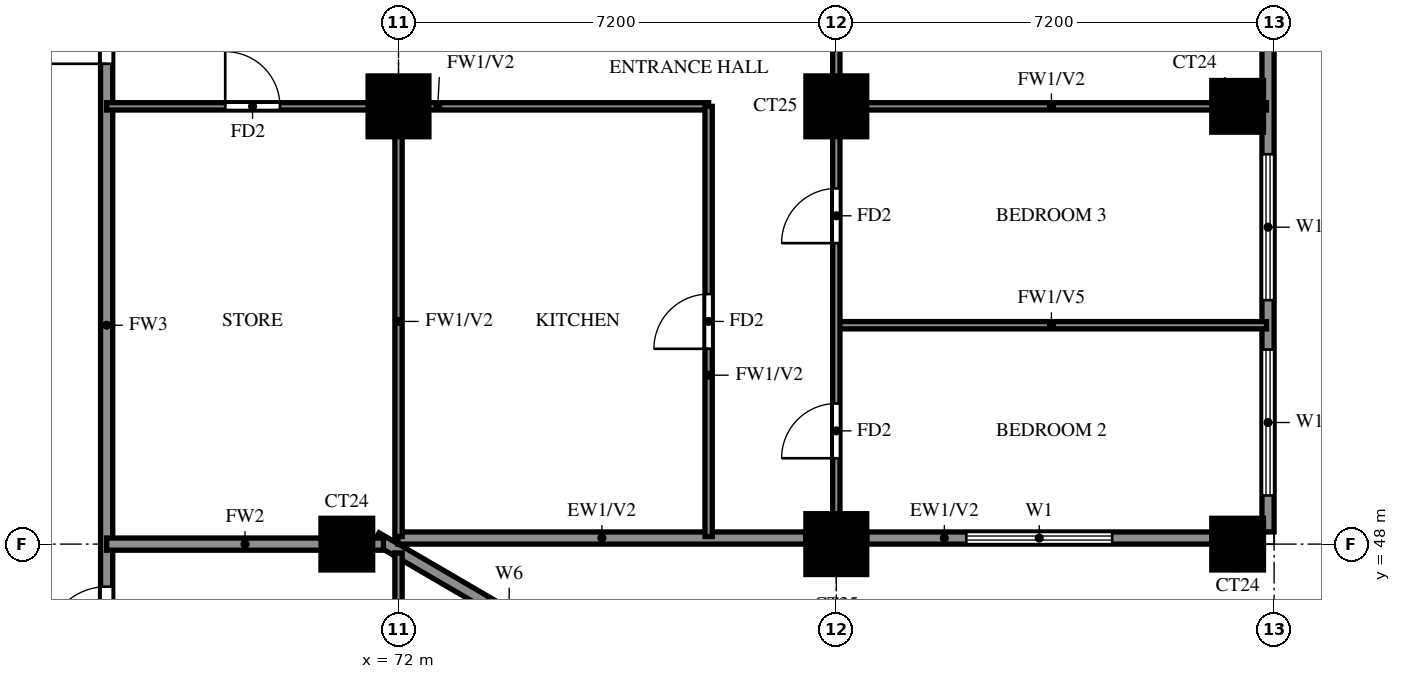
"""IFC4 building model, lengths in metres.
Left out: names, types, materials, properties, quantities, classifications, styles, units other than length and angle.
Written with IfcOpenShell. Run it as: python <this file> out.ifc"""

import sys

from ifc_helpers import new_model, si_unit, direction, frame, frame_2d, origin, origin_2d, place, context, subcontext, project, spatial, rectangle, extrude, source, transform, mapped, element, fill, save


model = new_model("IFC4")
c1 = context("Model", 3, precision=1e-05, world=origin(), true_north=direction((0.0, 1.0)))
c2 = subcontext(c1, "Body", "Model", "MODEL_VIEW")
j1 = project(units=[si_unit("LENGTHUNIT", "METRE"), si_unit("PLANEANGLEUNIT", "RADIAN")], contexts=[c1])
p1 = place(None, origin())
s1 = spatial("IfcSite", under=j1, at=p1, CompositionType="ELEMENT")
p2 = place(p1, origin())
s2 = spatial("IfcBuilding", under=s1, at=p2, CompositionType="ELEMENT")
p3 = place(p2, frame((0.0, 0.0, 153.5)))
s3 = spatial("IfcBuildingStorey", under=s2, at=p3, CompositionType="ELEMENT", Elevation=153.5)
m1 = source(origin(), c2, "Body", "SweptSolid", [
    extrude(rectangle(XDim=0.85, YDim=0.85, at=origin_2d()), origin(), (0.0, 0.0, 1.0), 3.2),
])
p4 = place(p3, frame((71.15, 48.0, 0.0), z_axis=(0.0, 0.0, 1.0), x_axis=(1.0, 0.0, 0.0)))
e1 = element("IfcColumn", 1, at=p4, inside=s3, PredefinedType="COLUMN", context=c2, shape_type="MappedRepresentation", body=[
    mapped(m1, transform((0.0, 0.0, 0.0))),
])
m2 = source(origin(), c2, "Body", "SweptSolid", [
    extrude(rectangle(XDim=1.0, YDim=1.0, at=origin_2d()), origin(), (0.0, 0.0, 1.0), 3.2),
])
p5 = place(p3, frame((79.2, 48.0, 0.0), z_axis=(0.0, 0.0, 1.0), x_axis=(1.0, 0.0, 0.0)))
e2 = element("IfcColumn", 2, at=p5, inside=s3, PredefinedType="COLUMN", context=c2, shape_type="MappedRepresentation", body=[
    mapped(m2, transform((0.0, 0.0, 0.0))),
])
p6 = place(p3, frame((85.8, 48.0, 0.0), z_axis=(0.0, 0.0, 1.0), x_axis=(1.0, 0.0, 0.0)))
e3 = element("IfcColumn", 3, at=p6, inside=s3, PredefinedType="COLUMN", context=c2, shape_type="MappedRepresentation", body=[
    mapped(m1, transform((0.0, 0.0, 0.0))),
])
for number, where, z_axis, x_axis in (
    (4, (72.0, 55.2, 0.0), (0.0, 0.0, 1.0), (1.0, 0.0, 0.0)),
    (5, (79.2, 55.2, 0.0), (0.0, 0.0, 1.0), (1.0, 0.0, 0.0)),
):
    element("IfcColumn", number, at=place(p3, frame(where, z_axis=z_axis, x_axis=x_axis)), inside=s3, PredefinedType="COLUMN", context=c2, shape_type="MappedRepresentation", body=[
        mapped(m2, transform((0.0, 0.0, 0.0))),
    ])
p7 = place(p3, frame((85.8, 55.2, 0.0), z_axis=(0.0, 0.0, 1.0), x_axis=(1.0, 0.0, 0.0)))
e6 = element("IfcColumn", 6, at=p7, inside=s3, PredefinedType="COLUMN", context=c2, shape_type="MappedRepresentation", body=[
    mapped(m1, transform((0.0, 0.0, 0.0))),
])
p8 = place(p3, frame((85.719, 39.881, 0.0), z_axis=(0.0, 0.0, 1.0), x_axis=(-0.86377618652, 0.503875678716, 0.0)))
e7 = element("IfcWall", 7, at=p8, inside=s3, PredefinedType="SOLIDWALL", context=c2, shape_type="SweptSolid", body=[
    extrude(rectangle(XDim=16.311, YDim=0.2, at=frame_2d((8.156, 0.0))), origin(), (0.0, 0.0, 1.0), 3.2),
])
p9 = place(p8, frame((13.326, 0.0, 1.5)))
e8 = element("IfcOpeningElement", 8, at=p9, cuts=e7, PredefinedType="OPENING", context=c2, shape_type="SweptSolid", body=[
    extrude(rectangle(XDim=0.9, YDim=0.9, at=frame_2d((0.45, 0.45))), frame((0.0, 0.11, 0.0), z_axis=(0.0, -1.0, 0.0), x_axis=(1.0, 0.0, 0.0)), (0.0, 0.0, 1.0), 0.22),
])
p10 = place(p3, frame((71.99, 48.1, 0.0), z_axis=(0.0, 0.0, 1.0), x_axis=(1.0, 0.0, 0.0)))
e9 = element("IfcWall", 9, at=p10, inside=s3, PredefinedType="SOLIDWALL", context=c2, shape_type="SweptSolid", body=[
    extrude(rectangle(XDim=6.71, YDim=0.2, at=frame_2d((3.355, 0.0))), origin(), (0.0, 0.0, 1.0), 3.2),
])
p11 = place(p3, frame((79.7, 48.1, 0.0), z_axis=(0.0, 0.0, 1.0), x_axis=(1.0, 0.0, 0.0)))
e10 = element("IfcWall", 10, at=p11, inside=s3, PredefinedType="SOLIDWALL", context=c2, shape_type="SweptSolid", body=[
    extrude(rectangle(XDim=5.675, YDim=0.2, at=frame_2d((2.837, 0.0))), origin(), (0.0, 0.0, 1.0), 3.2),
])
p12 = place(p11, frame((1.637, 0.0, 0.6)))
e11 = element("IfcOpeningElement", 11, at=p12, cuts=e10, PredefinedType="OPENING", context=c2, shape_type="SweptSolid", body=[
    extrude(rectangle(XDim=2.4, YDim=2.4, at=frame_2d((1.2, 1.2))), frame((0.0, 0.11, 0.0), z_axis=(0.0, -1.0, 0.0), x_axis=(1.0, 0.0, 0.0)), (0.0, 0.0, 1.0), 0.22),
])
p13 = place(p3, frame((86.3, 48.2, 0.0), z_axis=(0.0, 0.0, 1.0), x_axis=(0.0, 1.0, 0.0)))
e12 = element("IfcWall", 12, at=p13, inside=s3, PredefinedType="SOLIDWALL", context=c2, shape_type="SweptSolid", body=[
    extrude(rectangle(XDim=28.6, YDim=0.2, at=frame_2d((14.3, 0.0))), origin(), (0.0, 0.0, 1.0), 3.2),
])
p14 = place(p13, frame((15.1, 0.0, 0.0)))
e13 = element("IfcOpeningElement", 13, at=p14, cuts=e12, PredefinedType="OPENING", context=c2, shape_type="SweptSolid", body=[
    extrude(rectangle(XDim=1.8, YDim=2.4, at=frame_2d((0.9, 1.2))), frame((0.0, 0.11, 0.0), z_axis=(0.0, -1.0, 0.0), x_axis=(1.0, 0.0, 0.0)), (0.0, 0.0, 1.0), 0.22),
])
p15 = place(p13, frame((0.6, 0.0, 0.6)))
e14 = element("IfcOpeningElement", 14, at=p15, cuts=e12, PredefinedType="OPENING", context=c2, shape_type="SweptSolid", body=[
    extrude(rectangle(XDim=2.4, YDim=2.4, at=frame_2d((1.2, 1.2))), frame((0.0, 0.11, 0.0), z_axis=(0.0, -1.0, 0.0), x_axis=(1.0, 0.0, 0.0)), (0.0, 0.0, 1.0), 0.22),
])
p16 = place(p13, frame((3.812, 0.0, 0.6)))
e15 = element("IfcOpeningElement", 15, at=p16, cuts=e12, PredefinedType="OPENING", context=c2, shape_type="SweptSolid", body=[
    extrude(rectangle(XDim=2.4, YDim=2.4, at=frame_2d((1.2, 1.2))), frame((0.0, 0.11, 0.0), z_axis=(0.0, -1.0, 0.0), x_axis=(1.0, 0.0, 0.0)), (0.0, 0.0, 1.0), 0.22),
])
p17 = place(p13, frame((8.387, 0.0, 0.6)))
e16 = element("IfcOpeningElement", 16, at=p17, cuts=e12, PredefinedType="OPENING", context=c2, shape_type="SweptSolid", body=[
    extrude(rectangle(XDim=2.4, YDim=2.4, at=frame_2d((1.2, 1.2))), frame((0.0, 0.11, 0.0), z_axis=(0.0, -1.0, 0.0), x_axis=(1.0, 0.0, 0.0)), (0.0, 0.0, 1.0), 0.22),
])
p18 = place(p13, frame((12.512, 0.0, 0.6)))
e17 = element("IfcOpeningElement", 17, at=p18, cuts=e12, PredefinedType="OPENING", context=c2, shape_type="SweptSolid", body=[
    extrude(rectangle(XDim=1.2, YDim=2.4, at=frame_2d((0.6, 1.2))), frame((0.0, 0.11, 0.0), z_axis=(0.0, -1.0, 0.0), x_axis=(1.0, 0.0, 0.0)), (0.0, 0.0, 1.0), 0.22),
])
p19 = place(p13, frame((19.113, 0.0, 0.6)))
e18 = element("IfcOpeningElement", 18, at=p19, cuts=e12, PredefinedType="OPENING", context=c2, shape_type="SweptSolid", body=[
    extrude(rectangle(XDim=1.8, YDim=2.4, at=frame_2d((0.9, 1.2))), frame((0.0, 0.11, 0.0), z_axis=(0.0, -1.0, 0.0), x_axis=(1.0, 0.0, 0.0)), (0.0, 0.0, 1.0), 0.22),
])
p20 = place(p13, frame((22.188, 0.0, 0.6)))
e19 = element("IfcOpeningElement", 19, at=p20, cuts=e12, PredefinedType="OPENING", context=c2, shape_type="SweptSolid", body=[
    extrude(rectangle(XDim=2.4, YDim=2.4, at=frame_2d((1.2, 1.2))), frame((0.0, 0.11, 0.0), z_axis=(0.0, -1.0, 0.0), x_axis=(1.0, 0.0, 0.0)), (0.0, 0.0, 1.0), 0.22),
])
p21 = place(p13, frame((25.413, 0.0, 0.6)))
e20 = element("IfcOpeningElement", 20, at=p21, cuts=e12, PredefinedType="OPENING", context=c2, shape_type="SweptSolid", body=[
    extrude(rectangle(XDim=2.4, YDim=2.4, at=frame_2d((1.2, 1.2))), frame((0.0, 0.11, 0.0), z_axis=(0.0, -1.0, 0.0), x_axis=(1.0, 0.0, 0.0)), (0.0, 0.0, 1.0), 0.22),
])
p22 = place(p3, frame((67.2, 45.6, 0.0), z_axis=(0.0, 0.0, 1.0), x_axis=(0.0, 1.0, 0.0)))
e21 = element("IfcWall", 21, at=p22, inside=s3, PredefinedType="SOLIDWALL", context=c2, shape_type="SweptSolid", body=[
    extrude(rectangle(XDim=12.0, YDim=0.2, at=frame_2d((6.0, 0.0))), origin(), (0.0, 0.0, 1.0), 3.2),
])
p23 = place(p22, frame((10.3, 0.0, 0.0)))
e22 = element("IfcOpeningElement", 22, at=p23, cuts=e21, PredefinedType="OPENING", context=c2, shape_type="SweptSolid", body=[
    extrude(rectangle(XDim=1.0, YDim=2.1, at=frame_2d((0.5, 1.05))), frame((0.0, 0.11, 0.0), z_axis=(0.0, -1.0, 0.0), x_axis=(1.0, 0.0, 0.0)), (0.0, 0.0, 1.0), 0.22),
])
p24 = place(p22, frame((0.7, 0.0, 0.0)))
e23 = element("IfcOpeningElement", 23, at=p24, cuts=e21, PredefinedType="OPENING", context=c2, shape_type="SweptSolid", body=[
    extrude(rectangle(XDim=1.0, YDim=2.1, at=frame_2d((0.5, 1.05))), frame((0.0, 0.11, 0.0), z_axis=(0.0, -1.0, 0.0), x_axis=(1.0, 0.0, 0.0)), (0.0, 0.0, 1.0), 0.22),
])
p25 = place(p3, frame((67.2, 48.0, 0.0), z_axis=(0.0, 0.0, 1.0), x_axis=(1.0, 0.0, 0.0)))
e24 = element("IfcWall", 24, at=p25, inside=s3, PredefinedType="SOLIDWALL", context=c2, shape_type="SweptSolid", body=[
    extrude(rectangle(XDim=4.552, YDim=0.2, at=frame_2d((2.276, 0.0))), origin(), (0.0, 0.0, 1.0), 3.2),
])
p26 = place(p3, frame((79.2, 51.6, 0.0), z_axis=(0.0, 0.0, 1.0), x_axis=(1.0, 0.0, 0.0)))
e25 = element("IfcWall", 25, at=p26, inside=s3, PredefinedType="PARTITIONING", context=c2, shape_type="SweptSolid", body=[
    extrude(rectangle(XDim=7.075, YDim=0.12, at=frame_2d((3.538, 0.0))), origin(), (0.0, 0.0, 1.0), 2.3),
])
p27 = place(p3, frame((67.2, 55.2, 0.0), z_axis=(0.0, 0.0, 1.0), x_axis=(1.0, 0.0, 0.0)))
e26 = element("IfcWall", 26, at=p27, inside=s3, PredefinedType="PARTITIONING", context=c2, shape_type="SweptSolid", body=[
    extrude(rectangle(XDim=9.9, YDim=0.12, at=frame_2d((4.95, 0.0))), origin(), (0.0, 0.0, 1.0), 3.2),
])
p28 = place(p27, frame((1.95, 0.0, 0.0)))
e27 = element("IfcOpeningElement", 27, at=p28, cuts=e26, PredefinedType="OPENING", context=c2, shape_type="SweptSolid", body=[
    extrude(rectangle(XDim=0.9, YDim=2.1, at=frame_2d((0.45, 1.05))), frame((0.0, 0.07, 0.0), z_axis=(0.0, -1.0, 0.0), x_axis=(1.0, 0.0, 0.0)), (0.0, 0.0, 1.0), 0.14),
])
p29 = place(p3, frame((79.2, 55.2, 0.0), z_axis=(0.0, 0.0, 1.0), x_axis=(1.0, 0.0, 0.0)))
e28 = element("IfcWall", 28, at=p29, inside=s3, PredefinedType="PARTITIONING", context=c2, shape_type="SweptSolid", body=[
    extrude(rectangle(XDim=7.075, YDim=0.12, at=frame_2d((3.538, 0.0))), origin(), (0.0, 0.0, 1.0), 3.2),
])
p30 = place(p3, frame((72.0, 39.725, 0.0), z_axis=(0.0, 0.0, 1.0), x_axis=(0.0, 1.0, 0.0)))
e29 = element("IfcWall", 29, at=p30, inside=s3, PredefinedType="PARTITIONING", context=c2, shape_type="SweptSolid", body=[
    extrude(rectangle(XDim=8.13, YDim=0.12, at=frame_2d((4.065, 0.0))), origin(), (0.0, 0.0, 1.0), 2.3),
])
p31 = place(p30, frame((1.788, 0.0, 0.0)))
e30 = element("IfcOpeningElement", 30, at=p31, cuts=e29, PredefinedType="OPENING", context=c2, shape_type="SweptSolid", body=[
    extrude(rectangle(XDim=0.9, YDim=2.1, at=frame_2d((0.45, 1.05))), frame((0.0, 0.07, 0.0), z_axis=(0.0, -1.0, 0.0), x_axis=(1.0, 0.0, 0.0)), (0.0, 0.0, 1.0), 0.14),
])
p32 = place(p30, frame((4.575, 0.0, 0.0)))
e31 = element("IfcOpeningElement", 31, at=p32, cuts=e29, PredefinedType="OPENING", context=c2, shape_type="SweptSolid", body=[
    extrude(rectangle(XDim=0.8, YDim=2.1, at=frame_2d((0.4, 1.05))), frame((0.0, 0.07, 0.0), z_axis=(0.0, -1.0, 0.0), x_axis=(1.0, 0.0, 0.0)), (0.0, 0.0, 1.0), 0.14),
])
p33 = place(p3, frame((72.0, 48.125, 0.0), z_axis=(0.0, 0.0, 1.0), x_axis=(0.0, 1.0, 0.0)))
e32 = element("IfcWall", 32, at=p33, inside=s3, PredefinedType="PARTITIONING", context=c2, shape_type="SweptSolid", body=[
    extrude(rectangle(XDim=7.075, YDim=0.12, at=frame_2d((3.538, 0.0))), origin(), (0.0, 0.0, 1.0), 3.2),
])
p34 = place(p3, frame((77.1, 48.125, 0.0), z_axis=(0.0, 0.0, 1.0), x_axis=(0.0, 1.0, 0.0)))
e33 = element("IfcWall", 33, at=p34, inside=s3, PredefinedType="PARTITIONING", context=c2, shape_type="SweptSolid", body=[
    extrude(rectangle(XDim=7.075, YDim=0.12, at=frame_2d((3.538, 0.0))), origin(), (0.0, 0.0, 1.0), 3.2),
])
p35 = place(p34, frame((3.087, 0.0, 0.0)))
e34 = element("IfcOpeningElement", 34, at=p35, cuts=e33, PredefinedType="OPENING", context=c2, shape_type="SweptSolid", body=[
    extrude(rectangle(XDim=0.9, YDim=2.1, at=frame_2d((0.45, 1.05))), frame((0.0, 0.07, 0.0), z_axis=(0.0, -1.0, 0.0), x_axis=(1.0, 0.0, 0.0)), (0.0, 0.0, 1.0), 0.14),
])
p36 = place(p3, frame((79.2, 48.125, 0.0), z_axis=(0.0, 0.0, 1.0), x_axis=(0.0, 1.0, 0.0)))
e35 = element("IfcWall", 35, at=p36, inside=s3, PredefinedType="PARTITIONING", context=c2, shape_type="SweptSolid", body=[
    extrude(rectangle(XDim=25.075, YDim=0.12, at=frame_2d((12.538, 0.0))), origin(), (0.0, 0.0, 1.0), 3.2),
])
p37 = place(p36, frame((1.288, 0.0, 0.0)))
e36 = element("IfcOpeningElement", 36, at=p37, cuts=e35, PredefinedType="OPENING", context=c2, shape_type="SweptSolid", body=[
    extrude(rectangle(XDim=0.9, YDim=2.1, at=frame_2d((0.45, 1.05))), frame((0.0, 0.07, 0.0), z_axis=(0.0, -1.0, 0.0), x_axis=(1.0, 0.0, 0.0)), (0.0, 0.0, 1.0), 0.14),
])
p38 = place(p36, frame((4.825, 0.0, 0.0)))
e37 = element("IfcOpeningElement", 37, at=p38, cuts=e35, PredefinedType="OPENING", context=c2, shape_type="SweptSolid", body=[
    extrude(rectangle(XDim=0.9, YDim=2.1, at=frame_2d((0.45, 1.05))), frame((0.0, 0.07, 0.0), z_axis=(0.0, -1.0, 0.0), x_axis=(1.0, 0.0, 0.0)), (0.0, 0.0, 1.0), 0.14),
])
p39 = place(p36, frame((9.925, 0.0, 0.0)))
e38 = element("IfcOpeningElement", 38, at=p39, cuts=e35, PredefinedType="OPENING", context=c2, shape_type="SweptSolid", body=[
    extrude(rectangle(XDim=1.5, YDim=2.1, at=frame_2d((0.75, 1.05))), frame((0.0, 0.07, 0.0), z_axis=(0.0, -1.0, 0.0), x_axis=(1.0, 0.0, 0.0)), (0.0, 0.0, 1.0), 0.14),
])
p40 = place(p36, frame((15.625, 0.0, 0.0)))
e39 = element("IfcOpeningElement", 39, at=p40, cuts=e35, PredefinedType="OPENING", context=c2, shape_type="SweptSolid", body=[
    extrude(rectangle(XDim=0.9, YDim=2.1, at=frame_2d((0.45, 1.05))), frame((0.0, 0.07, 0.0), z_axis=(0.0, -1.0, 0.0), x_axis=(1.0, 0.0, 0.0)), (0.0, 0.0, 1.0), 0.14),
])
p41 = place(p36, frame((19.225, 0.0, 0.0)))
e40 = element("IfcOpeningElement", 40, at=p41, cuts=e35, PredefinedType="OPENING", context=c2, shape_type="SweptSolid", body=[
    extrude(rectangle(XDim=0.9, YDim=2.1, at=frame_2d((0.45, 1.05))), frame((0.0, 0.07, 0.0), z_axis=(0.0, -1.0, 0.0), x_axis=(1.0, 0.0, 0.0)), (0.0, 0.0, 1.0), 0.14),
])
p42 = place(p36, frame((22.825, 0.0, 0.0)))
e41 = element("IfcOpeningElement", 41, at=p42, cuts=e35, PredefinedType="OPENING", context=c2, shape_type="SweptSolid", body=[
    extrude(rectangle(XDim=0.9, YDim=2.1, at=frame_2d((0.45, 1.05))), frame((0.0, 0.07, 0.0), z_axis=(0.0, -1.0, 0.0), x_axis=(1.0, 0.0, 0.0)), (0.0, 0.0, 1.0), 0.14),
])
p43 = place(p12, origin())
e42 = element("IfcWindow", 42, at=p43, inside=s3, PartitioningType="DOUBLE_PANEL_VERTICAL", PredefinedType="WINDOW", context=c2, shape_type="SweptSolid", body=[
    extrude(rectangle(XDim=2.4, YDim=2.4, at=frame_2d((1.2, 1.2))), frame((0.0, 0.03, 0.0), z_axis=(0.0, -1.0, 0.0), x_axis=(1.0, 0.0, 0.0)), (0.0, 0.0, 1.0), 0.06),
])
fill(e11, e42)
p44 = place(p15, origin())
e43 = element("IfcWindow", 43, at=p44, inside=s3, PartitioningType="DOUBLE_PANEL_VERTICAL", PredefinedType="WINDOW", context=c2, shape_type="SweptSolid", body=[
    extrude(rectangle(XDim=2.4, YDim=2.4, at=frame_2d((1.2, 1.2))), frame((0.0, 0.03, 0.0), z_axis=(0.0, -1.0, 0.0), x_axis=(1.0, 0.0, 0.0)), (0.0, 0.0, 1.0), 0.06),
])
fill(e14, e43)
p45 = place(p16, origin())
e44 = element("IfcWindow", 44, at=p45, inside=s3, PartitioningType="DOUBLE_PANEL_VERTICAL", PredefinedType="WINDOW", context=c2, shape_type="SweptSolid", body=[
    extrude(rectangle(XDim=2.4, YDim=2.4, at=frame_2d((1.2, 1.2))), frame((0.0, 0.03, 0.0), z_axis=(0.0, -1.0, 0.0), x_axis=(1.0, 0.0, 0.0)), (0.0, 0.0, 1.0), 0.06),
])
fill(e15, e44)
p46 = place(p23, origin())
e45 = element("IfcDoor", 45, at=p46, inside=s3, OperationType="SINGLE_SWING_LEFT", PredefinedType="DOOR", context=c2, shape_type="SweptSolid", body=[
    extrude(rectangle(XDim=1.0, YDim=2.1, at=frame_2d((0.5, 1.05))), frame((0.0, 0.025, 0.0), z_axis=(0.0, -1.0, 0.0), x_axis=(1.0, 0.0, 0.0)), (0.0, 0.0, 1.0), 0.05),
])
fill(e22, e45)
p47 = place(p37, origin())
e46 = element("IfcDoor", 46, at=p47, inside=s3, OperationType="SINGLE_SWING_RIGHT", PredefinedType="DOOR", context=c2, shape_type="SweptSolid", body=[
    extrude(rectangle(XDim=0.9, YDim=2.1, at=frame_2d((0.45, 1.05))), frame((0.0, 0.025, 0.0), z_axis=(0.0, -1.0, 0.0), x_axis=(1.0, 0.0, 0.0)), (0.0, 0.0, 1.0), 0.05),
])
fill(e36, e46)
p48 = place(p38, origin())
e47 = element("IfcDoor", 47, at=p48, inside=s3, OperationType="SINGLE_SWING_LEFT", PredefinedType="DOOR", context=c2, shape_type="SweptSolid", body=[
    extrude(rectangle(XDim=0.9, YDim=2.1, at=frame_2d((0.45, 1.05))), frame((0.0, 0.025, 0.0), z_axis=(0.0, -1.0, 0.0), x_axis=(1.0, 0.0, 0.0)), (0.0, 0.0, 1.0), 0.05),
])
fill(e37, e47)
p49 = place(p35, origin())
e48 = element("IfcDoor", 48, at=p49, inside=s3, OperationType="SINGLE_SWING_RIGHT", PredefinedType="DOOR", context=c2, shape_type="SweptSolid", body=[
    extrude(rectangle(XDim=0.9, YDim=2.1, at=frame_2d((0.45, 1.05))), frame((0.0, 0.025, 0.0), z_axis=(0.0, -1.0, 0.0), x_axis=(1.0, 0.0, 0.0)), (0.0, 0.0, 1.0), 0.05),
])
fill(e34, e48)
p50 = place(p28, origin())
e49 = element("IfcDoor", 49, at=p50, inside=s3, OperationType="SINGLE_SWING_LEFT", PredefinedType="DOOR", context=c2, shape_type="SweptSolid", body=[
    extrude(rectangle(XDim=0.9, YDim=2.1, at=frame_2d((0.45, 1.05))), frame((0.0, 0.025, 0.0), z_axis=(0.0, -1.0, 0.0), x_axis=(1.0, 0.0, 0.0)), (0.0, 0.0, 1.0), 0.05),
])
fill(e27, e49)
p51 = place(p24, origin())
e50 = element("IfcDoor", 50, at=p51, inside=s3, OperationType="SINGLE_SWING_LEFT", PredefinedType="DOOR", context=c2, shape_type="SweptSolid", body=[
    extrude(rectangle(XDim=1.0, YDim=2.1, at=frame_2d((0.5, 1.05))), frame((0.0, 0.025, 0.0), z_axis=(0.0, -1.0, 0.0), x_axis=(1.0, 0.0, 0.0)), (0.0, 0.0, 1.0), 0.05),
])
fill(e23, e50)
save(model, sys.argv[1])
